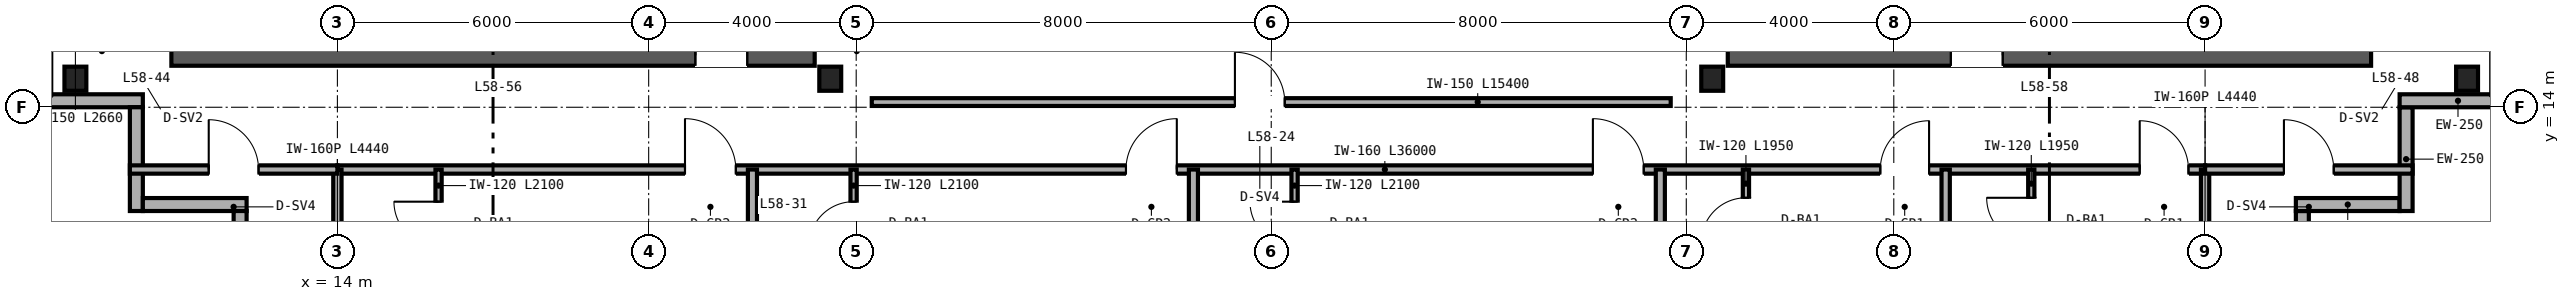
"""IFC4 building model, lengths in metres.
Left out: names, types, materials, properties, quantities, classifications, styles, units other than length and angle.
Written with IfcOpenShell. Run it as: python <this file> out.ifc"""

import sys

from ifc_helpers import new_model, si_unit, direction, frame, frame_2d, origin, origin_2d, place, context, subcontext, project, spatial, rectangle, i_section, extrude, source, transform, mapped, element, fill, save


model = new_model("IFC4")
c1 = context("Model", 3, precision=1e-05, world=origin(), true_north=direction((0.0, 1.0)))
c2 = subcontext(c1, "Body", "Model", "MODEL_VIEW")
j1 = project(units=[si_unit("LENGTHUNIT", "METRE"), si_unit("PLANEANGLEUNIT", "RADIAN")], contexts=[c1])
p1 = place(None, origin())
s1 = spatial("IfcSite", under=j1, at=p1, CompositionType="ELEMENT")
p2 = place(p1, origin())
s2 = spatial("IfcBuilding", under=s1, at=p2, CompositionType="ELEMENT")
p3 = place(p2, frame((0.0, 0.0, 232.8)))
s3 = spatial("IfcBuildingStorey", under=s2, at=p3, CompositionType="ELEMENT", Elevation=232.8)
p4 = place(p3, frame((10.8, 15.0, 0.0), z_axis=(0.0, 0.0, 1.0), x_axis=(1.0, 0.0, 0.0)))
e1 = element("IfcWall", 1, at=p4, inside=s3, PredefinedType="SHEAR", context=c2, shape_type="SweptSolid", body=[
    extrude(rectangle(XDim=12.4, YDim=0.4, at=frame_2d((6.2, 0.0))), origin(), (0.0, 0.0, 1.0), 3.38),
])
p5 = place(p4, frame((10.1, 0.0, 0.0)))
e2 = element("IfcOpeningElement", 2, at=p5, cuts=e1, PredefinedType="OPENING", context=c2, shape_type="SweptSolid", body=[
    extrude(rectangle(XDim=1.0, YDim=2.15, at=frame_2d((0.5, 1.075))), frame((0.0, 0.21, 0.0), z_axis=(0.0, -1.0, 0.0), x_axis=(1.0, 0.0, 0.0)), (0.0, 0.0, 1.0), 0.42),
])
p6 = place(p3, frame((40.8, 15.0, 0.0), z_axis=(0.0, 0.0, 1.0), x_axis=(1.0, 0.0, 0.0)))
e3 = element("IfcWall", 3, at=p6, inside=s3, PredefinedType="SHEAR", context=c2, shape_type="SweptSolid", body=[
    extrude(rectangle(XDim=12.4, YDim=0.4, at=frame_2d((6.2, 0.0))), origin(), (0.0, 0.0, 1.0), 3.38),
])
p7 = place(p6, frame((4.3, 0.0, 0.0)))
e4 = element("IfcOpeningElement", 4, at=p7, cuts=e3, PredefinedType="OPENING", context=c2, shape_type="SweptSolid", body=[
    extrude(rectangle(XDim=1.0, YDim=2.15, at=frame_2d((0.5, 1.075))), frame((0.0, 0.21, 0.0), z_axis=(0.0, -1.0, 0.0), x_axis=(1.0, 0.0, 0.0)), (0.0, 0.0, 1.0), 0.42),
])
m1 = source(origin(), c2, "Body", "SweptSolid", [
    extrude(i_section(OverallWidth=0.422, OverallDepth=0.465, WebThickness=0.045, FlangeThickness=0.073, FilletRadius=0.025, at=origin_2d()), origin(), (0.0, 0.0, 1.0), 3.38),
])
for number, where, z_axis, x_axis in (
    (5, (8.95, 14.55, 0.0), (0.0, 0.0, 1.0), (1.0, 0.0, 0.0)),
    (6, (23.5, 14.55, 0.0), (0.0, 0.0, 1.0), (1.0, 0.0, 0.0)),
    (7, (40.5, 14.55, 0.0), (0.0, 0.0, 1.0), (1.0, 0.0, 0.0)),
    (8, (55.05, 14.55, 0.0), (0.0, 0.0, 1.0), (1.0, 0.0, 0.0)),
):
    element("IfcColumn", number, at=place(p3, frame(where, z_axis=z_axis, x_axis=x_axis)), inside=s3, PredefinedType="COLUMN", context=c2, shape_type="MappedRepresentation", body=[
        mapped(m1, transform((0.0, 0.0, 0.0), scale=1.0)),
    ])
p8 = place(p3, frame((51.875, 10.0, 0.0), z_axis=(0.0, 0.0, 1.0), x_axis=(0.0, 1.0, 0.0)))
e9 = element("IfcWall", 9, at=p8, inside=s3, PredefinedType="SOLIDWALL", context=c2, shape_type="SweptSolid", body=[
    extrude(rectangle(XDim=2.0, YDim=0.25, at=frame_2d((1.0, 0.0))), origin(), (0.0, 0.0, 1.0), 3.38),
])
p9 = place(p8, frame((0.5, 0.0, 0.85)))
e10 = element("IfcOpeningElement", 10, at=p9, cuts=e9, PredefinedType="OPENING", context=c2, shape_type="SweptSolid", body=[
    extrude(rectangle(XDim=1.0, YDim=1.9, at=frame_2d((0.5, 0.95))), frame((0.0, 0.135, 0.0), z_axis=(0.0, -1.0, 0.0), x_axis=(1.0, 0.0, 0.0)), (0.0, 0.0, 1.0), 0.27),
])
for number, where, z_axis, x_axis in (
    (11, (51.75, 12.125, 0.0), (0.0, 0.0, 1.0), (1.0, 0.0, 0.0)),
    (12, (53.875, 12.0, 0.0), (0.0, 0.0, 1.0), (0.0, 1.0, 0.0)),
):
    element("IfcWall", number, at=place(p3, frame(where, z_axis=z_axis, x_axis=x_axis)), inside=s3, PredefinedType="SOLIDWALL", context=c2, shape_type="SweptSolid", body=[
        extrude(rectangle(XDim=2.0, YDim=0.25, at=frame_2d((1.0, 0.0))), origin(), (0.0, 0.0, 1.0), 3.38),
    ])
for number, where, z_axis, x_axis in (
    (13, (53.75, 14.125, 0.0), (0.0, 0.0, 1.0), (1.0, 0.0, 0.0)),
    (14, (8.0, 14.125, 0.0), (0.0, 0.0, 1.0), (1.0, 0.0, 0.0)),
):
    element("IfcWall", number, at=place(p3, frame(where, z_axis=z_axis, x_axis=x_axis)), inside=s3, PredefinedType="SOLIDWALL", context=c2, shape_type="SweptSolid", body=[
        extrude(rectangle(XDim=2.25, YDim=0.25, at=frame_2d((1.125, 0.0))), origin(), (0.0, 0.0, 1.0), 3.38),
    ])
for number, where, z_axis, x_axis in (
    (15, (10.125, 14.0, 0.0), (0.0, 0.0, 1.0), (0.0, -1.0, 0.0)),
    (16, (10.25, 12.125, 0.0), (0.0, 0.0, 1.0), (1.0, 0.0, 0.0)),
    (17, (12.125, 12.0, 0.0), (0.0, 0.0, 1.0), (0.0, -1.0, 0.0)),
):
    element("IfcWall", number, at=place(p3, frame(where, z_axis=z_axis, x_axis=x_axis)), inside=s3, PredefinedType="SOLIDWALL", context=c2, shape_type="SweptSolid", body=[
        extrude(rectangle(XDim=2.0, YDim=0.25, at=frame_2d((1.0, 0.0))), origin(), (0.0, 0.0, 1.0), 3.38),
    ])
p10 = place(p3, frame((24.3, 14.1, 0.0), z_axis=(0.0, 0.0, 1.0), x_axis=(1.0, 0.0, 0.0)))
e18 = element("IfcWall", 18, at=p10, inside=s3, PredefinedType="PARTITIONING", context=c2, shape_type="SweptSolid", body=[
    extrude(rectangle(XDim=15.4, YDim=0.15, at=frame_2d((7.7, 0.0))), origin(), (0.0, 0.0, 1.0), 3.38),
])
p11 = place(p10, frame((7.0, 0.0, 0.0)))
e19 = element("IfcOpeningElement", 19, at=p11, cuts=e18, PredefinedType="OPENING", context=c2, shape_type="SweptSolid", body=[
    extrude(rectangle(XDim=0.96, YDim=2.15, at=frame_2d((0.48, 1.075))), frame((0.0, 0.085, 0.0), z_axis=(0.0, -1.0, 0.0), x_axis=(1.0, 0.0, 0.0)), (0.0, 0.0, 1.0), 0.17),
])
p12 = place(p3, frame((14.0, 12.8, 0.0), z_axis=(0.0, 0.0, 1.0), x_axis=(1.0, 0.0, 0.0)))
e20 = element("IfcWall", 20, at=p12, inside=s3, PredefinedType="PARTITIONING", context=c2, shape_type="SweptSolid", body=[
    extrude(rectangle(XDim=36.0, YDim=0.16, at=frame_2d((18.0, 0.0))), origin(), (0.0, 0.0, 1.0), 2.923),
])
p13 = place(p12, frame((6.7, 0.0, 0.0)))
e21 = element("IfcOpeningElement", 21, at=p13, cuts=e20, PredefinedType="OPENING", context=c2, shape_type="SweptSolid", body=[
    extrude(rectangle(XDim=0.98, YDim=2.2, at=frame_2d((0.49, 1.1))), frame((0.0, 0.09, 0.0), z_axis=(0.0, -1.0, 0.0), x_axis=(1.0, 0.0, 0.0)), (0.0, 0.0, 1.0), 0.18),
])
p14 = place(p12, frame((15.2, 0.0, 0.0)))
e22 = element("IfcOpeningElement", 22, at=p14, cuts=e20, PredefinedType="OPENING", context=c2, shape_type="SweptSolid", body=[
    extrude(rectangle(XDim=0.98, YDim=2.2, at=frame_2d((0.49, 1.1))), frame((0.0, 0.09, 0.0), z_axis=(0.0, -1.0, 0.0), x_axis=(1.0, 0.0, 0.0)), (0.0, 0.0, 1.0), 0.18),
])
p15 = place(p12, frame((24.2, 0.0, 0.0)))
e23 = element("IfcOpeningElement", 23, at=p15, cuts=e20, PredefinedType="OPENING", context=c2, shape_type="SweptSolid", body=[
    extrude(rectangle(XDim=0.98, YDim=2.2, at=frame_2d((0.49, 1.1))), frame((0.0, 0.09, 0.0), z_axis=(0.0, -1.0, 0.0), x_axis=(1.0, 0.0, 0.0)), (0.0, 0.0, 1.0), 0.18),
])
p16 = place(p12, frame((29.74, 0.0, 0.0)))
e24 = element("IfcOpeningElement", 24, at=p16, cuts=e20, PredefinedType="OPENING", context=c2, shape_type="SweptSolid", body=[
    extrude(rectangle(XDim=0.94, YDim=2.15, at=frame_2d((0.47, 1.075))), frame((0.0, 0.09, 0.0), z_axis=(0.0, -1.0, 0.0), x_axis=(1.0, 0.0, 0.0)), (0.0, 0.0, 1.0), 0.18),
])
p17 = place(p12, frame((34.74, 0.0, 0.0)))
e25 = element("IfcOpeningElement", 25, at=p17, cuts=e20, PredefinedType="OPENING", context=c2, shape_type="SweptSolid", body=[
    extrude(rectangle(XDim=0.94, YDim=2.15, at=frame_2d((0.47, 1.075))), frame((0.0, 0.09, 0.0), z_axis=(0.0, -1.0, 0.0), x_axis=(1.0, 0.0, 0.0)), (0.0, 0.0, 1.0), 0.18),
])
for number, where, z_axis, x_axis in (
    (26, (14.0, 8.36, 0.0), (0.0, 0.0, 1.0), (0.0, 1.0, 0.0)),
    (27, (50.0, 8.36, 0.0), (0.0, 0.0, 1.0), (0.0, 1.0, 0.0)),
):
    element("IfcWall", number, at=place(p3, frame(where, z_axis=z_axis, x_axis=x_axis)), inside=s3, PredefinedType="PARTITIONING", context=c2, shape_type="SweptSolid", body=[
        extrude(rectangle(XDim=4.44, YDim=0.16, at=frame_2d((2.22, 0.0))), origin(), (0.0, 0.0, 1.0), 2.687),
    ])
p18 = place(p3, frame((22.0, 8.36, 0.0), z_axis=(0.0, 0.0, 1.0), x_axis=(0.0, 1.0, 0.0)))
e28 = element("IfcWall", 28, at=p18, inside=s3, PredefinedType="PARTITIONING", context=c2, shape_type="SweptSolid", body=[
    extrude(rectangle(XDim=4.44, YDim=0.175, at=frame_2d((2.22, 0.0))), origin(), (0.0, 0.0, 1.0), 2.843),
])
p19 = place(p3, frame((15.95, 10.7, 0.0), z_axis=(0.0, 0.0, 1.0), x_axis=(0.0, 1.0, 0.0)))
e29 = element("IfcWall", 29, at=p19, inside=s3, PredefinedType="PARTITIONING", context=c2, shape_type="SweptSolid", body=[
    extrude(rectangle(XDim=2.1, YDim=0.12, at=frame_2d((1.05, 0.0))), origin(), (0.0, 0.0, 1.0), 3.38),
])
p20 = place(p19, frame((0.62, 0.0, 0.0)))
e30 = element("IfcOpeningElement", 30, at=p20, cuts=e29, PredefinedType="OPENING", context=c2, shape_type="SweptSolid", body=[
    extrude(rectangle(XDim=0.86, YDim=2.1, at=frame_2d((0.43, 1.05))), frame((0.0, 0.07, 0.0), z_axis=(0.0, -1.0, 0.0), x_axis=(1.0, 0.0, 0.0)), (0.0, 0.0, 1.0), 0.14),
])
p21 = place(p3, frame((30.5, 8.36, 0.0), z_axis=(0.0, 0.0, 1.0), x_axis=(0.0, 1.0, 0.0)))
e31 = element("IfcWall", 31, at=p21, inside=s3, PredefinedType="PARTITIONING", context=c2, shape_type="SweptSolid", body=[
    extrude(rectangle(XDim=4.44, YDim=0.175, at=frame_2d((2.22, 0.0))), origin(), (0.0, 0.0, 1.0), 2.453),
])
p22 = place(p3, frame((23.95, 10.7, 0.0), z_axis=(0.0, 0.0, 1.0), x_axis=(0.0, 1.0, 0.0)))
e32 = element("IfcWall", 32, at=p22, inside=s3, PredefinedType="PARTITIONING", context=c2, shape_type="SweptSolid", body=[
    extrude(rectangle(XDim=2.1, YDim=0.12, at=frame_2d((1.05, 0.0))), origin(), (0.0, 0.0, 1.0), 3.38),
])
p23 = place(p22, frame((0.62, 0.0, 0.0)))
e33 = element("IfcOpeningElement", 33, at=p23, cuts=e32, PredefinedType="OPENING", context=c2, shape_type="SweptSolid", body=[
    extrude(rectangle(XDim=0.86, YDim=2.1, at=frame_2d((0.43, 1.05))), frame((0.0, 0.07, 0.0), z_axis=(0.0, -1.0, 0.0), x_axis=(1.0, 0.0, 0.0)), (0.0, 0.0, 1.0), 0.14),
])
p24 = place(p3, frame((39.5, 8.36, 0.0), z_axis=(0.0, 0.0, 1.0), x_axis=(0.0, 1.0, 0.0)))
e34 = element("IfcWall", 34, at=p24, inside=s3, PredefinedType="PARTITIONING", context=c2, shape_type="SweptSolid", body=[
    extrude(rectangle(XDim=4.44, YDim=0.175, at=frame_2d((2.22, 0.0))), origin(), (0.0, 0.0, 1.0), 2.453),
])
p25 = place(p3, frame((32.45, 10.7, 0.0), z_axis=(0.0, 0.0, 1.0), x_axis=(0.0, 1.0, 0.0)))
e35 = element("IfcWall", 35, at=p25, inside=s3, PredefinedType="PARTITIONING", context=c2, shape_type="SweptSolid", body=[
    extrude(rectangle(XDim=2.1, YDim=0.12, at=frame_2d((1.05, 0.0))), origin(), (0.0, 0.0, 1.0), 3.38),
])
p26 = place(p25, frame((0.62, 0.0, 0.0)))
e36 = element("IfcOpeningElement", 36, at=p26, cuts=e35, PredefinedType="OPENING", context=c2, shape_type="SweptSolid", body=[
    extrude(rectangle(XDim=0.86, YDim=2.1, at=frame_2d((0.43, 1.05))), frame((0.0, 0.07, 0.0), z_axis=(0.0, -1.0, 0.0), x_axis=(1.0, 0.0, 0.0)), (0.0, 0.0, 1.0), 0.14),
])
p27 = place(p3, frame((45.0, 8.36, 0.0), z_axis=(0.0, 0.0, 1.0), x_axis=(0.0, 1.0, 0.0)))
e37 = element("IfcWall", 37, at=p27, inside=s3, PredefinedType="PARTITIONING", context=c2, shape_type="SweptSolid", body=[
    extrude(rectangle(XDim=4.44, YDim=0.16, at=frame_2d((2.22, 0.0))), origin(), (0.0, 0.0, 1.0), 2.687),
])
p28 = place(p3, frame((41.15, 10.85, 0.0), z_axis=(0.0, 0.0, 1.0), x_axis=(0.0, 1.0, 0.0)))
e38 = element("IfcWall", 38, at=p28, inside=s3, PredefinedType="PARTITIONING", context=c2, shape_type="SweptSolid", body=[
    extrude(rectangle(XDim=1.95, YDim=0.12, at=frame_2d((0.975, 0.0))), origin(), (0.0, 0.0, 1.0), 3.38),
])
p29 = place(p28, frame((0.545, 0.0, 0.0)))
e39 = element("IfcOpeningElement", 39, at=p29, cuts=e38, PredefinedType="OPENING", context=c2, shape_type="SweptSolid", body=[
    extrude(rectangle(XDim=0.86, YDim=2.1, at=frame_2d((0.43, 1.05))), frame((0.0, 0.07, 0.0), z_axis=(0.0, -1.0, 0.0), x_axis=(1.0, 0.0, 0.0)), (0.0, 0.0, 1.0), 0.14),
])
p30 = place(p3, frame((46.65, 10.85, 0.0), z_axis=(0.0, 0.0, 1.0), x_axis=(0.0, 1.0, 0.0)))
e40 = element("IfcWall", 40, at=p30, inside=s3, PredefinedType="PARTITIONING", context=c2, shape_type="SweptSolid", body=[
    extrude(rectangle(XDim=1.95, YDim=0.12, at=frame_2d((0.975, 0.0))), origin(), (0.0, 0.0, 1.0), 3.38),
])
p31 = place(p30, frame((0.545, 0.0, 0.0)))
e41 = element("IfcOpeningElement", 41, at=p31, cuts=e40, PredefinedType="OPENING", context=c2, shape_type="SweptSolid", body=[
    extrude(rectangle(XDim=0.86, YDim=2.1, at=frame_2d((0.43, 1.05))), frame((0.0, 0.07, 0.0), z_axis=(0.0, -1.0, 0.0), x_axis=(1.0, 0.0, 0.0)), (0.0, 0.0, 1.0), 0.14),
])
p32 = place(p3, frame((10.0, 12.8, 0.0), z_axis=(0.0, 0.0, 1.0), x_axis=(1.0, 0.0, 0.0)))
e42 = element("IfcWall", 42, at=p32, inside=s3, PredefinedType="PARTITIONING", context=c2, shape_type="SweptSolid", body=[
    extrude(rectangle(XDim=4.0, YDim=0.16, at=frame_2d((2.0, 0.0))), origin(), (0.0, 0.0, 1.0), 3.38),
])
p33 = place(p32, frame((1.52, 0.0, 0.0)))
e43 = element("IfcOpeningElement", 43, at=p33, cuts=e42, PredefinedType="OPENING", context=c2, shape_type="SweptSolid", body=[
    extrude(rectangle(XDim=0.96, YDim=2.15, at=frame_2d((0.48, 1.075))), frame((0.0, 0.09, 0.0), z_axis=(0.0, -1.0, 0.0), x_axis=(1.0, 0.0, 0.0)), (0.0, 0.0, 1.0), 0.18),
])
p34 = place(p3, frame((50.0, 12.8, 0.0), z_axis=(0.0, 0.0, 1.0), x_axis=(1.0, 0.0, 0.0)))
e44 = element("IfcWall", 44, at=p34, inside=s3, PredefinedType="PARTITIONING", context=c2, shape_type="SweptSolid", body=[
    extrude(rectangle(XDim=4.0, YDim=0.16, at=frame_2d((2.0, 0.0))), origin(), (0.0, 0.0, 1.0), 3.38),
])
p35 = place(p34, frame((1.52, 0.0, 0.0)))
e45 = element("IfcOpeningElement", 45, at=p35, cuts=e44, PredefinedType="OPENING", context=c2, shape_type="SweptSolid", body=[
    extrude(rectangle(XDim=0.96, YDim=2.15, at=frame_2d((0.48, 1.075))), frame((0.0, 0.09, 0.0), z_axis=(0.0, -1.0, 0.0), x_axis=(1.0, 0.0, 0.0)), (0.0, 0.0, 1.0), 0.18),
])
m2 = source(origin(), c2, "Body", "SweptSolid", [
    extrude(rectangle(XDim=1.0, YDim=2.15, at=frame_2d((0.5, 1.075))), frame((0.0, 0.025, 0.0), z_axis=(0.0, -1.0, 0.0), x_axis=(1.0, 0.0, 0.0)), (0.0, 0.0, 1.0), 0.05),
])
p36 = place(p5, origin())
e46 = element("IfcDoor", 46, at=p36, inside=s3, OperationType="SINGLE_SWING_LEFT", PredefinedType="DOOR", context=c2, shape_type="MappedRepresentation", body=[
    mapped(m2, transform((0.0, 0.0, 0.0), scale=1.0)),
])
fill(e2, e46)
p37 = place(p7, origin())
e47 = element("IfcDoor", 47, at=p37, inside=s3, OperationType="SINGLE_SWING_RIGHT", PredefinedType="DOOR", context=c2, shape_type="MappedRepresentation", body=[
    mapped(m2, transform((0.0, 0.0, 0.0), scale=1.0)),
])
fill(e4, e47)
m3 = source(origin(), c2, "Body", "SweptSolid", [
    extrude(rectangle(XDim=0.96, YDim=2.15, at=frame_2d((0.48, 1.075))), frame((0.0, 0.025, 0.0), z_axis=(0.0, -1.0, 0.0), x_axis=(1.0, 0.0, 0.0)), (0.0, 0.0, 1.0), 0.05),
])
p38 = place(p11, origin())
e48 = element("IfcDoor", 48, at=p38, inside=s3, OperationType="SINGLE_SWING_LEFT", PredefinedType="DOOR", context=c2, shape_type="MappedRepresentation", body=[
    mapped(m3, transform((0.0, 0.0, 0.0), scale=1.0)),
])
fill(e19, e48)
m4 = source(origin(), c2, "Body", "SweptSolid", [
    extrude(rectangle(XDim=0.86, YDim=2.1, at=frame_2d((0.43, 1.05))), frame((0.0, 0.025, 0.0), z_axis=(0.0, -1.0, 0.0), x_axis=(1.0, 0.0, 0.0)), (0.0, 0.0, 1.0), 0.05),
])
p39 = place(p20, origin())
e49 = element("IfcDoor", 49, at=p39, inside=s3, OperationType="SINGLE_SWING_RIGHT", PredefinedType="DOOR", context=c2, shape_type="MappedRepresentation", body=[
    mapped(m4, transform((0.0, 0.0, 0.0), scale=1.0)),
])
fill(e30, e49)
p40 = place(p23, origin())
e50 = element("IfcDoor", 50, at=p40, inside=s3, OperationType="SINGLE_SWING_LEFT", PredefinedType="DOOR", context=c2, shape_type="MappedRepresentation", body=[
    mapped(m4, transform((0.0, 0.0, 0.0), scale=1.0)),
])
fill(e33, e50)
p41 = place(p26, origin())
e51 = element("IfcDoor", 51, at=p41, inside=s3, OperationType="SINGLE_SWING_RIGHT", PredefinedType="DOOR", context=c2, shape_type="MappedRepresentation", body=[
    mapped(m4, transform((0.0, 0.0, 0.0), scale=1.0)),
])
fill(e36, e51)
p42 = place(p29, origin())
e52 = element("IfcDoor", 52, at=p42, inside=s3, OperationType="SINGLE_SWING_LEFT", PredefinedType="DOOR", context=c2, shape_type="MappedRepresentation", body=[
    mapped(m4, transform((0.0, 0.0, 0.0), scale=1.0)),
])
fill(e39, e52)
p43 = place(p31, origin())
e53 = element("IfcDoor", 53, at=p43, inside=s3, OperationType="SINGLE_SWING_RIGHT", PredefinedType="DOOR", context=c2, shape_type="MappedRepresentation", body=[
    mapped(m4, transform((0.0, 0.0, 0.0), scale=1.0)),
])
fill(e41, e53)
m5 = source(origin(), c2, "Body", "SweptSolid", [
    extrude(rectangle(XDim=0.98, YDim=2.2, at=frame_2d((0.49, 1.1))), frame((0.0, 0.025, 0.0), z_axis=(0.0, -1.0, 0.0), x_axis=(1.0, 0.0, 0.0)), (0.0, 0.0, 1.0), 0.05),
])
p44 = place(p13, origin())
e54 = element("IfcDoor", 54, at=p44, inside=s3, OperationType="SINGLE_SWING_LEFT", PredefinedType="DOOR", context=c2, shape_type="MappedRepresentation", body=[
    mapped(m5, transform((0.0, 0.0, 0.0), scale=1.0)),
])
fill(e21, e54)
p45 = place(p14, origin())
e55 = element("IfcDoor", 55, at=p45, inside=s3, OperationType="SINGLE_SWING_RIGHT", PredefinedType="DOOR", context=c2, shape_type="MappedRepresentation", body=[
    mapped(m5, transform((0.0, 0.0, 0.0), scale=1.0)),
])
fill(e22, e55)
p46 = place(p15, origin())
e56 = element("IfcDoor", 56, at=p46, inside=s3, OperationType="SINGLE_SWING_LEFT", PredefinedType="DOOR", context=c2, shape_type="MappedRepresentation", body=[
    mapped(m5, transform((0.0, 0.0, 0.0), scale=1.0)),
])
fill(e23, e56)
m6 = source(origin(), c2, "Body", "SweptSolid", [
    extrude(rectangle(XDim=0.94, YDim=2.15, at=frame_2d((0.47, 1.075))), frame((0.0, 0.025, 0.0), z_axis=(0.0, -1.0, 0.0), x_axis=(1.0, 0.0, 0.0)), (0.0, 0.0, 1.0), 0.05),
])
p47 = place(p16, origin())
e57 = element("IfcDoor", 57, at=p47, inside=s3, OperationType="SINGLE_SWING_RIGHT", PredefinedType="DOOR", context=c2, shape_type="MappedRepresentation", body=[
    mapped(m6, transform((0.0, 0.0, 0.0), scale=1.0)),
])
fill(e24, e57)
p48 = place(p17, origin())
e58 = element("IfcDoor", 58, at=p48, inside=s3, OperationType="SINGLE_SWING_LEFT", PredefinedType="DOOR", context=c2, shape_type="MappedRepresentation", body=[
    mapped(m6, transform((0.0, 0.0, 0.0), scale=1.0)),
])
fill(e25, e58)
p49 = place(p33, origin())
e59 = element("IfcDoor", 59, at=p49, inside=s3, OperationType="SINGLE_SWING_LEFT", PredefinedType="DOOR", context=c2, shape_type="MappedRepresentation", body=[
    mapped(m3, transform((0.0, 0.0, 0.0), scale=1.0)),
])
fill(e43, e59)
p50 = place(p35, origin())
e60 = element("IfcDoor", 60, at=p50, inside=s3, OperationType="SINGLE_SWING_LEFT", PredefinedType="DOOR", context=c2, shape_type="MappedRepresentation", body=[
    mapped(m3, transform((0.0, 0.0, 0.0), scale=1.0)),
])
fill(e45, e60)
save(model, sys.argv[1])
